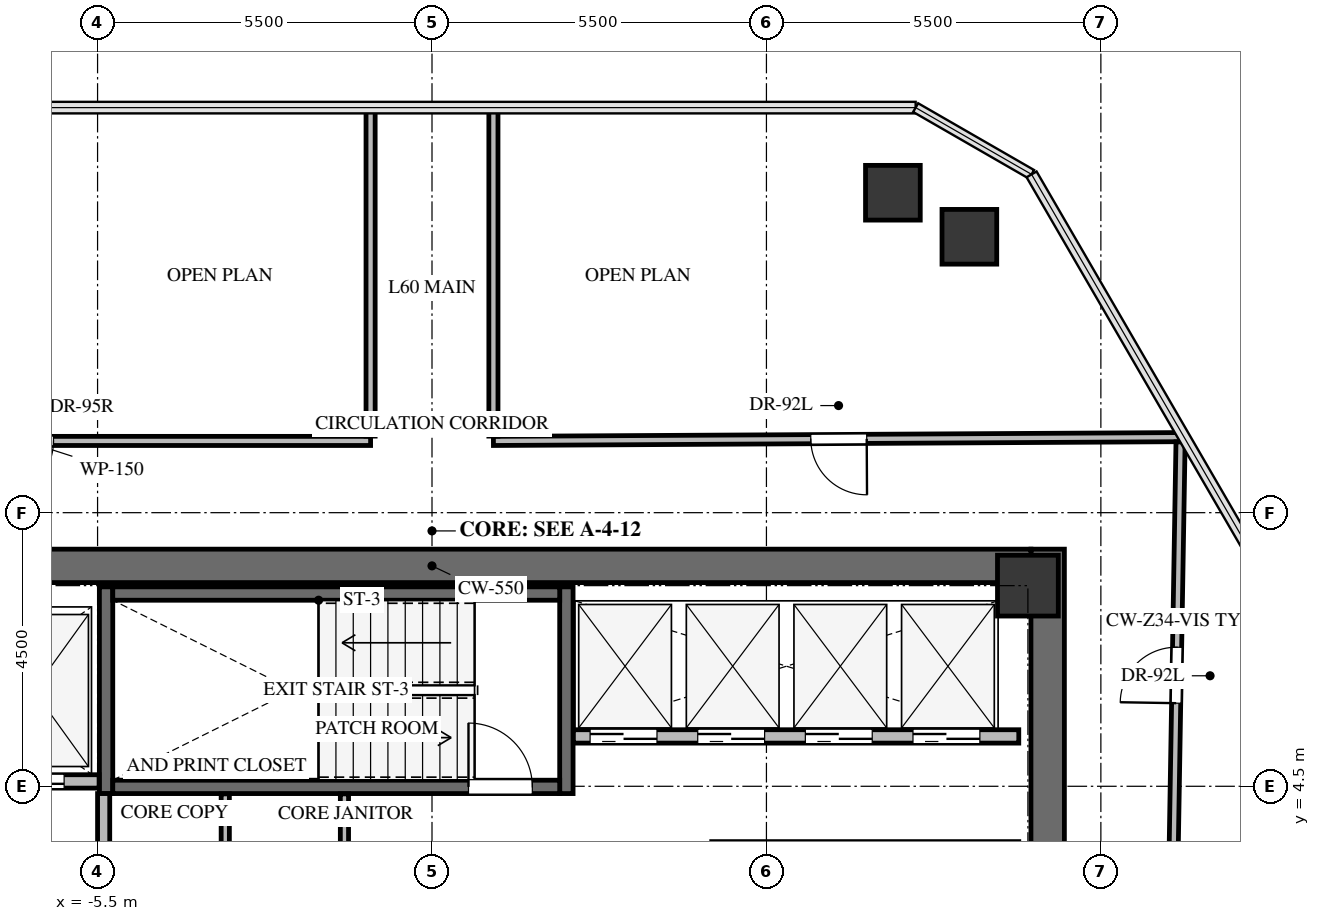
"""IFC4 building model, lengths in metres.
Left out: names, types, materials, properties, quantities, classifications, styles, units other than length and angle.
Written with IfcOpenShell. Run it as: python <this file> out.ifc"""

import sys

from ifc_helpers import new_model, si_unit, direction, frame, frame_2d, origin, origin_2d, place, context, subcontext, project, spatial, rectangle, extrude, source, transform, mapped, element, fill, save


model = new_model("IFC4")
c1 = context("Model", 3, precision=1e-05, world=origin(), true_north=direction((0.0, 1.0)))
c2 = subcontext(c1, "Body", "Model", "MODEL_VIEW")
j1 = project(units=[si_unit("LENGTHUNIT", "METRE"), si_unit("PLANEANGLEUNIT", "RADIAN")], contexts=[c1])
p1 = place(None, origin())
s1 = spatial("IfcSite", under=j1, at=p1, CompositionType="ELEMENT")
p2 = place(p1, origin())
s2 = spatial("IfcBuilding", under=s1, at=p2, CompositionType="ELEMENT")
p3 = place(p2, frame((0.0, 0.0, 218.3)))
s3 = spatial("IfcBuildingStorey", under=s2, at=p3, CompositionType="ELEMENT", Elevation=218.3)
p4 = place(p3, frame((10.125, -8.4, 0.0), z_axis=(0.0, 0.0, 1.0), x_axis=(0.0, 1.0, 0.0)))
e1 = element("IfcWall", 1, at=p4, inside=s3, PredefinedType="SHEAR", context=c2, shape_type="SweptSolid", body=[
    extrude(rectangle(XDim=16.8, YDim=0.55, at=frame_2d((8.4, 0.0))), origin(), (0.0, 0.0, 1.0), 3.3),
])
p5 = place(p3, frame((-9.85, 8.125, 0.0), z_axis=(0.0, 0.0, 1.0), x_axis=(1.0, 0.0, 0.0)))
e2 = element("IfcWall", 2, at=p5, inside=s3, PredefinedType="SHEAR", context=c2, shape_type="SweptSolid", body=[
    extrude(rectangle(XDim=19.7, YDim=0.55, at=frame_2d((9.85, 0.0))), origin(), (0.0, 0.0, 1.0), 3.3),
])
for number, where, z_axis, x_axis in (
    (3, (2.21, 4.38, -0.24), (0.0, 0.0, 1.0), (0.0, 1.0, 0.0)),
    (4, (-5.36, 7.78, -0.24), (0.0, 0.0, 1.0), (0.0, -1.0, 0.0)),
):
    element("IfcWall", number, at=place(p3, frame(where, z_axis=z_axis, x_axis=x_axis)), inside=s3, PredefinedType="SHEAR", context=c2, shape_type="SweptSolid", body=[
        extrude(rectangle(XDim=3.4, YDim=0.22, at=frame_2d((1.7, 0.0))), origin(), (0.0, 0.0, 1.0), 3.3),
    ])
p6 = place(p3, frame((-5.25, 4.49, -0.24), z_axis=(0.0, 0.0, 1.0), x_axis=(1.0, 0.0, 0.0)))
e5 = element("IfcWall", 5, at=p6, inside=s3, PredefinedType="SHEAR", context=c2, shape_type="SweptSolid", body=[
    extrude(rectangle(XDim=7.35, YDim=0.22, at=frame_2d((3.675, 0.0))), origin(), (0.0, 0.0, 1.0), 3.3),
])
p7 = place(p6, frame((5.85, 0.0, 0.0)))
e6 = element("IfcOpeningElement", 6, at=p7, cuts=e5, PredefinedType="OPENING", context=c2, shape_type="SweptSolid", body=[
    extrude(rectangle(XDim=1.05, YDim=2.15, at=frame_2d((0.525, 1.075))), frame((0.0, 0.12, 0.0), z_axis=(0.0, -1.0, 0.0), x_axis=(1.0, 0.0, 0.0)), (0.0, 0.0, 1.0), 0.24),
])
p8 = place(p3, frame((2.1, 7.67, -0.24), z_axis=(0.0, 0.0, 1.0), x_axis=(-1.0, 0.0, 0.0)))
e7 = element("IfcWall", 7, at=p8, inside=s3, PredefinedType="SHEAR", context=c2, shape_type="SweptSolid", body=[
    extrude(rectangle(XDim=7.35, YDim=0.22, at=frame_2d((3.675, 0.0))), origin(), (0.0, 0.0, 1.0), 3.3),
])
m1 = source(origin(), c2, "Body", "SweptSolid", [
    extrude(rectangle(XDim=1.0, YDim=1.0, at=origin_2d()), origin(), (0.0, 0.0, 1.0), 3.3),
])
p9 = place(p3, frame((9.8, 7.8, -0.24), z_axis=(0.0, 0.0, 1.0), x_axis=(1.0, 0.0, 0.0)))
e8 = element("IfcColumn", 8, at=p9, inside=s3, PredefinedType="COLUMN", context=c2, shape_type="MappedRepresentation", body=[
    mapped(m1, transform((0.0, 0.0, 0.0), x_axis=(1.0, 0.0, 0.0), y_axis=(0.0, 1.0, 0.0), z_axis=(0.0, 0.0, 1.0), scale=1.0)),
])
m2 = source(origin(), c2, "Body", "SweptSolid", [
    extrude(rectangle(XDim=0.9, YDim=0.9, at=origin_2d()), origin(), (0.0, 0.0, 1.0), 3.3),
])
for number, where, z_axis, x_axis in (
    (9, (7.58, 14.262, -0.24), (0.0, 0.0, 1.0), (1.0, 0.0, 0.0)),
    (10, (8.837, 13.538, -0.24), (0.0, 0.0, 1.0), (1.0, 0.0, 0.0)),
):
    element("IfcColumn", number, at=place(p3, frame(where, z_axis=z_axis, x_axis=x_axis)), inside=s3, PredefinedType="COLUMN", context=c2, shape_type="MappedRepresentation", body=[
        mapped(m2, transform((0.0, 0.0, 0.0), x_axis=(1.0, 0.0, 0.0), y_axis=(0.0, 1.0, 0.0), z_axis=(0.0, 0.0, 1.0), scale=1.0)),
    ])
p10 = place(p3, frame((-9.65, 4.58, 0.0), z_axis=(0.0, 0.0, 1.0), x_axis=(1.0, 0.0, 0.0)))
e11 = element("IfcWall", 11, at=p10, inside=s3, PredefinedType="SOLIDWALL", context=c2, shape_type="SweptSolid", body=[
    extrude(rectangle(XDim=4.175, YDim=0.22, at=frame_2d((2.087, 0.0))), origin(), (0.0, 0.0, 1.0), 3.045),
])
p11 = place(p10, frame((0.4, 0.0, 0.0)))
e12 = element("IfcOpeningElement", 12, at=p11, cuts=e11, PredefinedType="OPENING", context=c2, shape_type="SweptSolid", body=[
    extrude(rectangle(XDim=1.2, YDim=2.15, at=frame_2d((0.6, 1.075))), frame((0.0, 0.12, 0.0), z_axis=(0.0, -1.0, 0.0), x_axis=(1.0, 0.0, 0.0)), (0.0, 0.0, 1.0), 0.24),
])
p12 = place(p10, frame((2.4, 0.0, 0.0)))
e13 = element("IfcOpeningElement", 13, at=p12, cuts=e11, PredefinedType="OPENING", context=c2, shape_type="SweptSolid", body=[
    extrude(rectangle(XDim=1.2, YDim=2.15, at=frame_2d((0.6, 1.075))), frame((0.0, 0.12, 0.0), z_axis=(0.0, -1.0, 0.0), x_axis=(1.0, 0.0, 0.0)), (0.0, 0.0, 1.0), 0.24),
])
p13 = place(p3, frame((-5.4, 0.354, 0.0), z_axis=(0.0, 0.0, 1.0), x_axis=(0.0, 1.0, 0.0)))
e14 = element("IfcWall", 14, at=p13, inside=s3, PredefinedType="SOLIDWALL", context=c2, shape_type="SweptSolid", body=[
    extrude(rectangle(XDim=4.026, YDim=0.2, at=frame_2d((2.013, 0.0))), origin(), (0.0, 0.0, 1.0), 3.045),
])
p14 = place(p13, frame((0.246, 0.0, 0.0)))
e15 = element("IfcOpeningElement", 15, at=p14, cuts=e14, PredefinedType="OPENING", context=c2, shape_type="SweptSolid", body=[
    extrude(rectangle(XDim=1.0, YDim=2.15, at=frame_2d((0.5, 1.075))), frame((0.0, 0.11, 0.0), z_axis=(0.0, -1.0, 0.0), x_axis=(1.0, 0.0, 0.0)), (0.0, 0.0, 1.0), 0.22),
])
p15 = place(p3, frame((2.325, 5.32, 0.0), z_axis=(0.0, 0.0, 1.0), x_axis=(1.0, 0.0, 0.0)))
e16 = element("IfcWall", 16, at=p15, inside=s3, PredefinedType="SOLIDWALL", context=c2, shape_type="SweptSolid", body=[
    extrude(rectangle(XDim=7.325, YDim=0.22, at=frame_2d((3.663, 0.0))), origin(), (0.0, 0.0, 1.0), 3.045),
])
p16 = place(p15, frame((0.275, 0.0, 0.0)))
e17 = element("IfcOpeningElement", 17, at=p16, cuts=e16, PredefinedType="OPENING", context=c2, shape_type="SweptSolid", body=[
    extrude(rectangle(XDim=1.1, YDim=2.15, at=frame_2d((0.55, 1.075))), frame((0.0, 0.12, 0.0), z_axis=(0.0, -1.0, 0.0), x_axis=(1.0, 0.0, 0.0)), (0.0, 0.0, 1.0), 0.24),
])
p17 = place(p15, frame((2.045, 0.0, 0.0)))
e18 = element("IfcOpeningElement", 18, at=p17, cuts=e16, PredefinedType="OPENING", context=c2, shape_type="SweptSolid", body=[
    extrude(rectangle(XDim=1.1, YDim=2.15, at=frame_2d((0.55, 1.075))), frame((0.0, 0.12, 0.0), z_axis=(0.0, -1.0, 0.0), x_axis=(1.0, 0.0, 0.0)), (0.0, 0.0, 1.0), 0.24),
])
p18 = place(p15, frame((3.815, 0.0, 0.0)))
e19 = element("IfcOpeningElement", 19, at=p18, cuts=e16, PredefinedType="OPENING", context=c2, shape_type="SweptSolid", body=[
    extrude(rectangle(XDim=1.1, YDim=2.15, at=frame_2d((0.55, 1.075))), frame((0.0, 0.12, 0.0), z_axis=(0.0, -1.0, 0.0), x_axis=(1.0, 0.0, 0.0)), (0.0, 0.0, 1.0), 0.24),
])
p19 = place(p15, frame((5.585, 0.0, 0.0)))
e20 = element("IfcOpeningElement", 20, at=p19, cuts=e16, PredefinedType="OPENING", context=c2, shape_type="SweptSolid", body=[
    extrude(rectangle(XDim=1.1, YDim=2.15, at=frame_2d((0.55, 1.075))), frame((0.0, 0.12, 0.0), z_axis=(0.0, -1.0, 0.0), x_axis=(1.0, 0.0, 0.0)), (0.0, 0.0, 1.0), 0.24),
])
p20 = place(p3, frame((-1.01, 10.18, 0.0), z_axis=(0.0, 0.0, 1.0), x_axis=(-1.0, 0.0, 0.0)))
e21 = element("IfcWall", 21, at=p20, inside=s3, PredefinedType="PARTITIONING", context=c2, shape_type="SweptSolid", body=[
    extrude(rectangle(XDim=11.38, YDim=0.15, at=frame_2d((5.69, 0.0))), origin(), (0.0, 0.0, 1.0), 2.301),
])
p21 = place(p20, frame((5.215, 0.0, 0.0)))
e22 = element("IfcOpeningElement", 22, at=p21, cuts=e21, PredefinedType="OPENING", context=c2, shape_type="SweptSolid", body=[
    extrude(rectangle(XDim=0.95, YDim=2.1, at=frame_2d((0.475, 1.05))), frame((0.0, 0.085, 0.0), z_axis=(0.0, -1.0, 0.0), x_axis=(1.0, 0.0, 0.0)), (0.0, 0.0, 1.0), 0.17),
])
p22 = place(p3, frame((-1.01, 15.662, 0.0), z_axis=(0.0, 0.0, 1.0), x_axis=(0.0, -1.0, 0.0)))
e23 = element("IfcWall", 23, at=p22, inside=s3, PredefinedType="PARTITIONING", context=c2, shape_type="SweptSolid", body=[
    extrude(rectangle(XDim=5.403, YDim=0.15, at=frame_2d((2.702, 0.0))), origin(), (0.0, 0.0, 1.0), 2.399),
])
p23 = place(p3, frame((12.368, 10.243, 0.0), z_axis=(0.0, 0.0, 1.0), x_axis=(-0.999984623931, -0.005545439622, 0.0)))
e24 = element("IfcWall", 24, at=p23, inside=s3, PredefinedType="PARTITIONING", context=c2, shape_type="SweptSolid", body=[
    extrude(rectangle(XDim=11.359, YDim=0.15, at=frame_2d((5.679, 0.0))), origin(), (0.0, 0.0, 1.0), 2.301),
])
p24 = place(p23, frame((5.219, 0.0, 0.0)))
e25 = element("IfcOpeningElement", 25, at=p24, cuts=e24, PredefinedType="OPENING", context=c2, shape_type="SweptSolid", body=[
    extrude(rectangle(XDim=0.92, YDim=2.1, at=frame_2d((0.46, 1.05))), frame((0.0, 0.085, 0.0), z_axis=(0.0, -1.0, 0.0), x_axis=(1.0, 0.0, 0.0)), (0.0, 0.0, 1.0), 0.17),
])
p25 = place(p3, frame((1.01, 10.259, 0.0), z_axis=(0.0, 0.0, 1.0), x_axis=(0.0, 1.0, 0.0)))
e26 = element("IfcWall", 26, at=p25, inside=s3, PredefinedType="PARTITIONING", context=c2, shape_type="SweptSolid", body=[
    extrude(rectangle(XDim=5.403, YDim=0.15, at=frame_2d((2.702, 0.0))), origin(), (0.0, 0.0, 1.0), 2.399),
])
p26 = place(p3, frame((12.181, 2.49, 0.0), z_axis=(0.0, 0.0, 1.0), x_axis=(0.016828134389, 0.999858396921, 0.0)))
e27 = element("IfcWall", 27, at=p26, inside=s3, PredefinedType="PARTITIONING", context=c2, shape_type="SweptSolid", body=[
    extrude(rectangle(XDim=7.675, YDim=0.15, at=frame_2d((3.837, 0.0))), origin(), (0.0, 0.0, 1.0), 2.399),
])
p27 = place(p26, frame((3.377, 0.0, 0.0)))
e28 = element("IfcOpeningElement", 28, at=p27, cuts=e27, PredefinedType="OPENING", context=c2, shape_type="SweptSolid", body=[
    extrude(rectangle(XDim=0.92, YDim=2.1, at=frame_2d((0.46, 1.05))), frame((0.0, 0.085, 0.0), z_axis=(0.0, -1.0, 0.0), x_axis=(1.0, 0.0, 0.0)), (0.0, 0.0, 1.0), 0.17),
])
p28 = place(p3, frame((-3.4, 4.375, 0.0), z_axis=(0.0, 0.0, 1.0), x_axis=(0.0, -1.0, 0.0)))
e29 = element("IfcWall", 29, at=p28, inside=s3, PredefinedType="PARTITIONING", context=c2, shape_type="SweptSolid", body=[
    extrude(rectangle(XDim=2.586, YDim=0.135, at=frame_2d((1.293, 0.0))), origin(), (0.0, 0.0, 1.0), 3.045),
])
p29 = place(p3, frame((-1.44, 4.375, 0.0), z_axis=(0.0, 0.0, 1.0), x_axis=(0.0, -1.0, 0.0)))
e30 = element("IfcWall", 30, at=p29, inside=s3, PredefinedType="PARTITIONING", context=c2, shape_type="SweptSolid", body=[
    extrude(rectangle(XDim=2.561, YDim=0.135, at=frame_2d((1.281, 0.0))), origin(), (0.0, 0.0, 1.0), 3.045),
])
m3 = source(origin(), c2, "Body", "SweptSolid", [
    extrude(rectangle(XDim=1.05, YDim=2.15, at=frame_2d((0.525, 1.075))), frame((0.0, 0.025, 0.0), z_axis=(0.0, -1.0, 0.0), x_axis=(1.0, 0.0, 0.0)), (0.0, 0.0, 1.0), 0.05),
])
p30 = place(p7, origin())
e31 = element("IfcDoor", 31, at=p30, inside=s3, OperationType="SINGLE_SWING_LEFT", PredefinedType="DOOR", context=c2, shape_type="MappedRepresentation", body=[
    mapped(m3, transform((0.0, 0.0, 0.0), x_axis=(1.0, 0.0, 0.0), y_axis=(0.0, 1.0, 0.0), z_axis=(0.0, 0.0, 1.0), scale=1.0)),
])
fill(e6, e31)
m4 = source(origin(), c2, "Body", "SweptSolid", [
    extrude(rectangle(XDim=1.2, YDim=2.15, at=frame_2d((0.6, 1.075))), frame((0.0, 0.025, 0.0), z_axis=(0.0, -1.0, 0.0), x_axis=(1.0, 0.0, 0.0)), (0.0, 0.0, 1.0), 0.05),
])
p31 = place(p12, origin())
e32 = element("IfcDoor", 32, at=p31, inside=s3, OperationType="DOUBLE_DOOR_SLIDING", PredefinedType="DOOR", context=c2, shape_type="MappedRepresentation", body=[
    mapped(m4, transform((0.0, 0.0, 0.0), x_axis=(1.0, 0.0, 0.0), y_axis=(0.0, 1.0, 0.0), z_axis=(0.0, 0.0, 1.0), scale=1.0)),
])
fill(e13, e32)
m5 = source(origin(), c2, "Body", "SweptSolid", [
    extrude(rectangle(XDim=1.1, YDim=2.15, at=frame_2d((0.55, 1.075))), frame((0.0, 0.025, 0.0), z_axis=(0.0, -1.0, 0.0), x_axis=(1.0, 0.0, 0.0)), (0.0, 0.0, 1.0), 0.05),
])
p32 = place(p16, origin())
e33 = element("IfcDoor", 33, at=p32, inside=s3, OperationType="DOUBLE_DOOR_SLIDING", PredefinedType="DOOR", context=c2, shape_type="MappedRepresentation", body=[
    mapped(m5, transform((0.0, 0.0, 0.0), x_axis=(1.0, 0.0, 0.0), y_axis=(0.0, 1.0, 0.0), z_axis=(0.0, 0.0, 1.0), scale=1.0)),
])
fill(e17, e33)
p33 = place(p17, origin())
e34 = element("IfcDoor", 34, at=p33, inside=s3, OperationType="DOUBLE_DOOR_SLIDING", PredefinedType="DOOR", context=c2, shape_type="MappedRepresentation", body=[
    mapped(m5, transform((0.0, 0.0, 0.0), x_axis=(1.0, 0.0, 0.0), y_axis=(0.0, 1.0, 0.0), z_axis=(0.0, 0.0, 1.0), scale=1.0)),
])
fill(e18, e34)
p34 = place(p18, origin())
e35 = element("IfcDoor", 35, at=p34, inside=s3, OperationType="DOUBLE_DOOR_SLIDING", PredefinedType="DOOR", context=c2, shape_type="MappedRepresentation", body=[
    mapped(m5, transform((0.0, 0.0, 0.0), x_axis=(1.0, 0.0, 0.0), y_axis=(0.0, 1.0, 0.0), z_axis=(0.0, 0.0, 1.0), scale=1.0)),
])
fill(e19, e35)
p35 = place(p19, origin())
e36 = element("IfcDoor", 36, at=p35, inside=s3, OperationType="DOUBLE_DOOR_SLIDING", PredefinedType="DOOR", context=c2, shape_type="MappedRepresentation", body=[
    mapped(m5, transform((0.0, 0.0, 0.0), x_axis=(1.0, 0.0, 0.0), y_axis=(0.0, 1.0, 0.0), z_axis=(0.0, 0.0, 1.0), scale=1.0)),
])
fill(e20, e36)
m6 = source(origin(), c2, "Body", "SweptSolid", [
    extrude(rectangle(XDim=0.95, YDim=2.1, at=frame_2d((0.475, 1.05))), frame((0.0, 0.025, 0.0), z_axis=(0.0, -1.0, 0.0), x_axis=(1.0, 0.0, 0.0)), (0.0, 0.0, 1.0), 0.05),
])
p36 = place(p21, origin())
e37 = element("IfcDoor", 37, at=p36, inside=s3, OperationType="SINGLE_SWING_RIGHT", PredefinedType="DOOR", context=c2, shape_type="MappedRepresentation", body=[
    mapped(m6, transform((0.0, 0.0, 0.0), x_axis=(1.0, 0.0, 0.0), y_axis=(0.0, 1.0, 0.0), z_axis=(0.0, 0.0, 1.0), scale=1.0)),
])
fill(e22, e37)
m7 = source(origin(), c2, "Body", "SweptSolid", [
    extrude(rectangle(XDim=0.92, YDim=2.1, at=frame_2d((0.46, 1.05))), frame((0.0, 0.025, 0.0), z_axis=(0.0, -1.0, 0.0), x_axis=(1.0, 0.0, 0.0)), (0.0, 0.0, 1.0), 0.05),
])
p37 = place(p24, origin())
e38 = element("IfcDoor", 38, at=p37, inside=s3, OperationType="SINGLE_SWING_LEFT", PredefinedType="DOOR", context=c2, shape_type="MappedRepresentation", body=[
    mapped(m7, transform((0.0, 0.0, 0.0), x_axis=(1.0, 0.0, 0.0), y_axis=(0.0, 1.0, 0.0), z_axis=(0.0, 0.0, 1.0), scale=1.0)),
])
fill(e25, e38)
p38 = place(p27, origin())
e39 = element("IfcDoor", 39, at=p38, inside=s3, OperationType="SINGLE_SWING_LEFT", PredefinedType="DOOR", context=c2, shape_type="MappedRepresentation", body=[
    mapped(m7, transform((0.0, 0.0, 0.0), x_axis=(1.0, 0.0, 0.0), y_axis=(0.0, 1.0, 0.0), z_axis=(0.0, 0.0, 1.0), scale=1.0)),
])
fill(e28, e39)
save(model, sys.argv[1])
